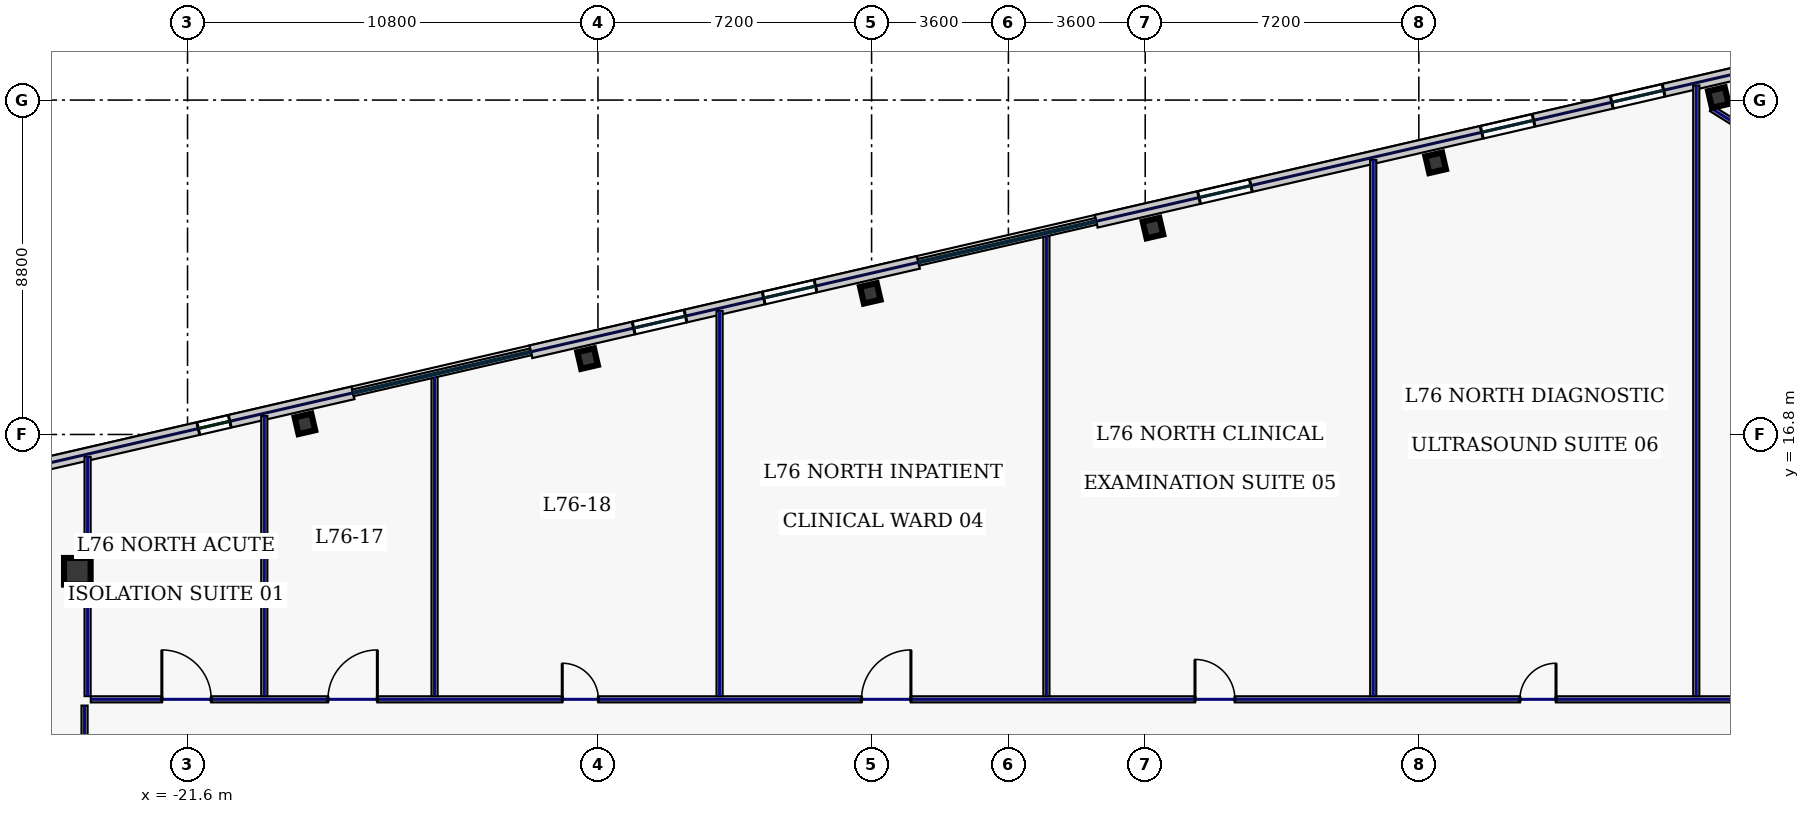
"""IFC4 building model, lengths in metres.
Left out: names, types, materials, properties, quantities, classifications, styles, units other than length and angle.
Written with IfcOpenShell. Run it as: python <this file> out.ifc"""

import sys

from ifc_helpers import new_model, si_unit, direction, frame, frame_2d, origin, origin_2d, place, context, subcontext, project, spatial, rectangle, hollow_rectangle, extrude, element, fill, save


model = new_model("IFC4")
c1 = context("Model", 3, precision=1e-05, world=origin(), true_north=direction((0.0, 1.0)))
c2 = subcontext(c1, "Body", "Model", "MODEL_VIEW")
j1 = project(units=[si_unit("LENGTHUNIT", "METRE"), si_unit("PLANEANGLEUNIT", "RADIAN")], contexts=[c1])
p1 = place(None, origin())
s1 = spatial("IfcSite", under=j1, at=p1, CompositionType="ELEMENT")
p2 = place(p1, origin())
s2 = spatial("IfcBuilding", under=s1, at=p2, CompositionType="ELEMENT")
p3 = place(p2, frame((0.0, 0.0, 325.0)))
s3 = spatial("IfcBuildingStorey", under=s2, at=p3, CompositionType="ELEMENT", Elevation=325.0)
p4 = place(p3, frame((-24.5, 13.2, 0.0), z_axis=(0.0, 0.0, 1.0), x_axis=(1.0, 0.0, 0.0)))
e1 = element("IfcColumn", 1, at=p4, inside=s3, PredefinedType="COLUMN", context=c2, shape_type="SweptSolid", body=[
    extrude(hollow_rectangle(XDim=0.7, YDim=0.7, WallThickness=0.032, at=origin_2d()), origin(), (0.0, 0.0, 1.0), 3.74),
])
for number, where, z_axis, x_axis in (
    (2, (18.682, 25.666, 0.0), (0.0, 0.0, 1.0), (0.974, 0.225, 0.0)),
    (3, (11.243, 23.949, 0.0), (0.0, 0.0, 1.0), (0.974, 0.225, 0.0)),
    (4, (3.804, 22.232, 0.0), (0.0, 0.0, 1.0), (0.974, 0.225, 0.0)),
    (5, (-3.634, 20.514, 0.0), (0.0, 0.0, 1.0), (0.974, 0.225, 0.0)),
    (6, (-11.073, 18.797, 0.0), (0.0, 0.0, 1.0), (0.974, 0.225, 0.0)),
    (7, (-18.511, 17.08, 0.0), (0.0, 0.0, 1.0), (0.974, 0.225, 0.0)),
):
    element("IfcColumn", number, at=place(p3, frame(where, z_axis=z_axis, x_axis=x_axis)), inside=s3, PredefinedType="COLUMN", context=c2, shape_type="SweptSolid", body=[
        extrude(hollow_rectangle(XDim=0.45, YDim=0.45, WallThickness=0.022, at=origin_2d()), origin(), (0.0, 0.0, 1.0), 3.74),
    ])
p5 = place(p3, frame((19.229, 26.316, 0.0), z_axis=(0.0, 0.0, 1.0), x_axis=(-0.974372473594, -0.224940620392, 0.0)))
e8 = element("IfcWall", 8, at=p5, inside=s3, PredefinedType="STANDARD", context=c2, shape_type="SweptSolid", body=[
    extrude(rectangle(XDim=17.366, YDim=0.34, at=frame_2d((8.683, 0.0))), origin(), (0.0, 0.0, 1.0), 3.74),
])
p6 = place(p5, frame((13.187, 0.0, 1.0)))
e9 = element("IfcOpeningElement", 9, at=p6, cuts=e8, PredefinedType="OPENING", context=c2, shape_type="SweptSolid", body=[
    extrude(rectangle(XDim=1.4, YDim=1.85, at=frame_2d((0.7, 0.925))), frame((0.0, 0.18, 0.0), z_axis=(0.0, -1.0, 0.0), x_axis=(1.0, 0.0, 0.0)), (0.0, 0.0, 1.0), 0.36),
])
p7 = place(p5, frame((5.553, 0.0, 1.0)))
e10 = element("IfcOpeningElement", 10, at=p7, cuts=e8, PredefinedType="OPENING", context=c2, shape_type="SweptSolid", body=[
    extrude(rectangle(XDim=1.4, YDim=1.85, at=frame_2d((0.7, 0.925))), frame((0.0, 0.18, 0.0), z_axis=(0.0, -1.0, 0.0), x_axis=(1.0, 0.0, 0.0)), (0.0, 0.0, 1.0), 0.36),
])
p8 = place(p5, frame((2.041, 0.0, 1.0)))
e11 = element("IfcOpeningElement", 11, at=p8, cuts=e8, PredefinedType="OPENING", context=c2, shape_type="SweptSolid", body=[
    extrude(rectangle(XDim=1.4, YDim=1.85, at=frame_2d((0.7, 0.925))), frame((0.0, 0.18, 0.0), z_axis=(0.0, -1.0, 0.0), x_axis=(1.0, 0.0, 0.0)), (0.0, 0.0, 1.0), 0.36),
])
p9 = place(p3, frame((-2.368, 21.33, 0.0), z_axis=(0.0, 0.0, 1.0), x_axis=(-0.974367213107, -0.224963405961, 0.0)))
e12 = element("IfcWall", 12, at=p9, inside=s3, PredefinedType="STANDARD", context=c2, shape_type="SweptSolid", body=[
    extrude(rectangle(XDim=10.468, YDim=0.34, at=frame_2d((5.234, 0.0))), origin(), (0.0, 0.0, 1.0), 3.74),
])
p10 = place(p9, frame((6.29, 0.0, 1.0)))
e13 = element("IfcOpeningElement", 13, at=p10, cuts=e12, PredefinedType="OPENING", context=c2, shape_type="SweptSolid", body=[
    extrude(rectangle(XDim=1.4, YDim=1.85, at=frame_2d((0.7, 0.925))), frame((0.0, 0.18, 0.0), z_axis=(0.0, -1.0, 0.0), x_axis=(1.0, 0.0, 0.0)), (0.0, 0.0, 1.0), 0.36),
])
p11 = place(p9, frame((2.778, 0.0, 1.0)))
e14 = element("IfcOpeningElement", 14, at=p11, cuts=e12, PredefinedType="OPENING", context=c2, shape_type="SweptSolid", body=[
    extrude(rectangle(XDim=1.4, YDim=1.85, at=frame_2d((0.7, 0.925))), frame((0.0, 0.18, 0.0), z_axis=(0.0, -1.0, 0.0), x_axis=(1.0, 0.0, 0.0)), (0.0, 0.0, 1.0), 0.36),
])
p12 = place(p3, frame((-17.245, 17.895, 0.0), z_axis=(0.0, 0.0, 1.0), x_axis=(-0.97437318493, -0.224937539085, 0.0)))
e15 = element("IfcWall", 15, at=p12, inside=s3, PredefinedType="STANDARD", context=c2, shape_type="SweptSolid", body=[
    extrude(rectangle(XDim=17.366, YDim=0.34, at=frame_2d((8.683, 0.0))), origin(), (0.0, 0.0, 1.0), 3.74),
])
p13 = place(p12, frame((13.925, 0.0, 1.0)))
e16 = element("IfcOpeningElement", 16, at=p13, cuts=e15, PredefinedType="OPENING", context=c2, shape_type="SweptSolid", body=[
    extrude(rectangle(XDim=1.4, YDim=1.85, at=frame_2d((0.7, 0.925))), frame((0.0, 0.18, 0.0), z_axis=(0.0, -1.0, 0.0), x_axis=(1.0, 0.0, 0.0)), (0.0, 0.0, 1.0), 0.36),
])
p14 = place(p12, frame((10.413, 0.0, 1.0)))
e17 = element("IfcOpeningElement", 17, at=p14, cuts=e15, PredefinedType="OPENING", context=c2, shape_type="SweptSolid", body=[
    extrude(rectangle(XDim=1.4, YDim=1.85, at=frame_2d((0.7, 0.925))), frame((0.0, 0.18, 0.0), z_axis=(0.0, -1.0, 0.0), x_axis=(1.0, 0.0, 0.0)), (0.0, 0.0, 1.0), 0.36),
])
p15 = place(p12, frame((3.329, 0.0, 1.0)))
e18 = element("IfcOpeningElement", 18, at=p15, cuts=e15, PredefinedType="OPENING", context=c2, shape_type="SweptSolid", body=[
    extrude(rectangle(XDim=0.85, YDim=1.85, at=frame_2d((0.425, 0.925))), frame((0.0, 0.18, 0.0), z_axis=(0.0, -1.0, 0.0), x_axis=(1.0, 0.0, 0.0)), (0.0, 0.0, 1.0), 0.36),
])
p16 = place(p3, frame((24.018, 21.931, 0.0), z_axis=(0.0, 0.0, 1.0), x_axis=(-0.848051009591, 0.529914601736, 0.0)))
e19 = element("IfcWall", 19, at=p16, inside=s3, PredefinedType="PARTITIONING", context=c2, shape_type="SweptSolid", body=[
    extrude(rectangle(XDim=6.505, YDim=0.16, at=frame_2d((3.253, 0.0))), origin(), (0.0, 0.0, 1.0), 3.74),
])
p17 = place(p3, frame((-24.31, -9.615, 0.0), z_axis=(0.0, 0.0, 1.0), x_axis=(0.0, 1.0, 0.0)))
e20 = element("IfcWall", 20, at=p17, inside=s3, PredefinedType="PARTITIONING", context=c2, shape_type="SweptSolid", body=[
    extrude(rectangle(XDim=19.28, YDim=0.16, at=frame_2d((9.64, 0.0))), origin(), (0.0, 0.0, 1.0), 3.74),
])
p18 = place(p17, frame((1.969, 0.0, 0.0)))
e21 = element("IfcOpeningElement", 21, at=p18, cuts=e20, PredefinedType="OPENING", context=c2, shape_type="SweptSolid", body=[
    extrude(rectangle(XDim=0.95, YDim=2.2, at=frame_2d((0.475, 1.1))), frame((0.0, 0.09, 0.0), z_axis=(0.0, -1.0, 0.0), x_axis=(1.0, 0.0, 0.0)), (0.0, 0.0, 1.0), 0.18),
])
p19 = place(p17, frame((6.625, 0.0, 0.0)))
e22 = element("IfcOpeningElement", 22, at=p19, cuts=e20, PredefinedType="OPENING", context=c2, shape_type="SweptSolid", body=[
    extrude(rectangle(XDim=0.95, YDim=2.2, at=frame_2d((0.475, 1.1))), frame((0.0, 0.09, 0.0), z_axis=(0.0, -1.0, 0.0), x_axis=(1.0, 0.0, 0.0)), (0.0, 0.0, 1.0), 0.18),
])
p20 = place(p17, frame((11.825, 0.0, 0.0)))
e23 = element("IfcOpeningElement", 23, at=p20, cuts=e20, PredefinedType="OPENING", context=c2, shape_type="SweptSolid", body=[
    extrude(rectangle(XDim=0.95, YDim=2.2, at=frame_2d((0.475, 1.1))), frame((0.0, 0.09, 0.0), z_axis=(0.0, -1.0, 0.0), x_axis=(1.0, 0.0, 0.0)), (0.0, 0.0, 1.0), 0.18),
])
p21 = place(p17, frame((16.506, 0.0, 0.0)))
e24 = element("IfcOpeningElement", 24, at=p21, cuts=e20, PredefinedType="OPENING", context=c2, shape_type="SweptSolid", body=[
    extrude(rectangle(XDim=0.95, YDim=2.2, at=frame_2d((0.475, 1.1))), frame((0.0, 0.09, 0.0), z_axis=(0.0, -1.0, 0.0), x_axis=(1.0, 0.0, 0.0)), (0.0, 0.0, 1.0), 0.18),
])
p22 = place(p3, frame((-24.145, 9.83, 0.0), z_axis=(0.0, 0.0, 1.0), x_axis=(1.0, 0.0, 0.0)))
e25 = element("IfcWall", 25, at=p22, inside=s3, PredefinedType="PARTITIONING", context=c2, shape_type="SweptSolid", body=[
    extrude(rectangle(XDim=48.29, YDim=0.16, at=frame_2d((24.145, 0.0))), origin(), (0.0, 0.0, 1.0), 3.74),
])
p23 = place(p22, frame((1.869, 0.0, 0.0)))
e26 = element("IfcOpeningElement", 26, at=p23, cuts=e25, PredefinedType="OPENING", context=c2, shape_type="SweptSolid", body=[
    extrude(rectangle(XDim=1.3, YDim=2.2, at=frame_2d((0.65, 1.1))), frame((0.0, 0.09, 0.0), z_axis=(0.0, -1.0, 0.0), x_axis=(1.0, 0.0, 0.0)), (0.0, 0.0, 1.0), 0.18),
])
p24 = place(p22, frame((6.24, 0.0, 0.0)))
e27 = element("IfcOpeningElement", 27, at=p24, cuts=e25, PredefinedType="OPENING", context=c2, shape_type="SweptSolid", body=[
    extrude(rectangle(XDim=1.3, YDim=2.2, at=frame_2d((0.65, 1.1))), frame((0.0, 0.09, 0.0), z_axis=(0.0, -1.0, 0.0), x_axis=(1.0, 0.0, 0.0)), (0.0, 0.0, 1.0), 0.18),
])
p25 = place(p22, frame((12.405, 0.0, 0.0)))
e28 = element("IfcOpeningElement", 28, at=p25, cuts=e25, PredefinedType="OPENING", context=c2, shape_type="SweptSolid", body=[
    extrude(rectangle(XDim=0.95, YDim=2.2, at=frame_2d((0.475, 1.1))), frame((0.0, 0.09, 0.0), z_axis=(0.0, -1.0, 0.0), x_axis=(1.0, 0.0, 0.0)), (0.0, 0.0, 1.0), 0.18),
])
p26 = place(p22, frame((20.28, 0.0, 0.0)))
e29 = element("IfcOpeningElement", 29, at=p26, cuts=e25, PredefinedType="OPENING", context=c2, shape_type="SweptSolid", body=[
    extrude(rectangle(XDim=1.3, YDim=2.2, at=frame_2d((0.65, 1.1))), frame((0.0, 0.09, 0.0), z_axis=(0.0, -1.0, 0.0), x_axis=(1.0, 0.0, 0.0)), (0.0, 0.0, 1.0), 0.18),
])
p27 = place(p22, frame((29.055, 0.0, 0.0)))
e30 = element("IfcOpeningElement", 30, at=p27, cuts=e25, PredefinedType="OPENING", context=c2, shape_type="SweptSolid", body=[
    extrude(rectangle(XDim=1.05, YDim=2.2, at=frame_2d((0.525, 1.1))), frame((0.0, 0.09, 0.0), z_axis=(0.0, -1.0, 0.0), x_axis=(1.0, 0.0, 0.0)), (0.0, 0.0, 1.0), 0.18),
])
p28 = place(p22, frame((37.605, 0.0, 0.0)))
e31 = element("IfcOpeningElement", 31, at=p28, cuts=e25, PredefinedType="OPENING", context=c2, shape_type="SweptSolid", body=[
    extrude(rectangle(XDim=0.95, YDim=2.2, at=frame_2d((0.475, 1.1))), frame((0.0, 0.09, 0.0), z_axis=(0.0, -1.0, 0.0), x_axis=(1.0, 0.0, 0.0)), (0.0, 0.0, 1.0), 0.18),
])
p29 = place(p22, frame((44.726, 0.0, 0.0)))
e32 = element("IfcOpeningElement", 32, at=p29, cuts=e25, PredefinedType="OPENING", context=c2, shape_type="SweptSolid", body=[
    extrude(rectangle(XDim=0.95, YDim=2.2, at=frame_2d((0.475, 1.1))), frame((0.0, 0.09, 0.0), z_axis=(0.0, -1.0, 0.0), x_axis=(1.0, 0.0, 0.0)), (0.0, 0.0, 1.0), 0.18),
])
p30 = place(p3, frame((-24.23, 9.915, 0.0), z_axis=(0.0, 0.0, 1.0), x_axis=(0.0, 1.0, 0.0)))
e33 = element("IfcWall", 33, at=p30, inside=s3, PredefinedType="PARTITIONING", context=c2, shape_type="SweptSolid", body=[
    extrude(rectangle(XDim=6.296, YDim=0.16, at=frame_2d((3.148, 0.0))), origin(), (0.0, 0.0, 1.0), 3.74),
])
p31 = place(p3, frame((-19.58, 9.915, 0.0), z_axis=(0.0, 0.0, 1.0), x_axis=(0.0, 1.0, 0.0)))
e34 = element("IfcWall", 34, at=p31, inside=s3, PredefinedType="PARTITIONING", context=c2, shape_type="SweptSolid", body=[
    extrude(rectangle(XDim=7.369, YDim=0.16, at=frame_2d((3.685, 0.0))), origin(), (0.0, 0.0, 1.0), 3.74),
])
p32 = place(p3, frame((-15.1, 9.915, 0.0), z_axis=(0.0, 0.0, 1.0), x_axis=(0.0, 1.0, 0.0)))
e35 = element("IfcWall", 35, at=p32, inside=s3, PredefinedType="PARTITIONING", context=c2, shape_type="SweptSolid", body=[
    extrude(rectangle(XDim=8.404, YDim=0.16, at=frame_2d((4.202, 0.0))), origin(), (0.0, 0.0, 1.0), 3.74),
])
p33 = place(p3, frame((-7.6, 9.915, 0.0), z_axis=(0.0, 0.0, 1.0), x_axis=(0.0, 1.0, 0.0)))
e36 = element("IfcWall", 36, at=p33, inside=s3, PredefinedType="PARTITIONING", context=c2, shape_type="SweptSolid", body=[
    extrude(rectangle(XDim=10.135, YDim=0.16, at=frame_2d((5.068, 0.0))), origin(), (0.0, 0.0, 1.0), 3.74),
])
p34 = place(p3, frame((1.0, 9.915, 0.0), z_axis=(0.0, 0.0, 1.0), x_axis=(0.0, 1.0, 0.0)))
e37 = element("IfcWall", 37, at=p34, inside=s3, PredefinedType="PARTITIONING", context=c2, shape_type="SweptSolid", body=[
    extrude(rectangle(XDim=12.121, YDim=0.16, at=frame_2d((6.06, 0.0))), origin(), (0.0, 0.0, 1.0), 3.74),
])
p35 = place(p3, frame((9.6, 9.915, 0.0), z_axis=(0.0, 0.0, 1.0), x_axis=(0.0, 1.0, 0.0)))
e38 = element("IfcWall", 38, at=p35, inside=s3, PredefinedType="PARTITIONING", context=c2, shape_type="SweptSolid", body=[
    extrude(rectangle(XDim=14.106, YDim=0.16, at=frame_2d((7.053, 0.0))), origin(), (0.0, 0.0, 1.0), 3.74),
])
p36 = place(p3, frame((18.1, 9.915, 0.0), z_axis=(0.0, 0.0, 1.0), x_axis=(0.0, 1.0, 0.0)))
e39 = element("IfcWall", 39, at=p36, inside=s3, PredefinedType="PARTITIONING", context=c2, shape_type="SweptSolid", body=[
    extrude(rectangle(XDim=16.069, YDim=0.16, at=frame_2d((8.034, 0.0))), origin(), (0.0, 0.0, 1.0), 3.74),
])
p37 = place(p6, origin())
e40 = element("IfcWindow", 40, at=p37, inside=s3, PartitioningType="SINGLE_PANEL", PredefinedType="WINDOW", context=c2, shape_type="SweptSolid", body=[
    extrude(rectangle(XDim=1.4, YDim=1.85, at=frame_2d((0.7, 0.925))), frame((0.0, 0.03, 0.0), z_axis=(0.0, -1.0, 0.0), x_axis=(1.0, 0.0, 0.0)), (0.0, 0.0, 1.0), 0.06),
])
fill(e9, e40)
p38 = place(p7, origin())
e41 = element("IfcWindow", 41, at=p38, inside=s3, PartitioningType="SINGLE_PANEL", PredefinedType="WINDOW", context=c2, shape_type="SweptSolid", body=[
    extrude(rectangle(XDim=1.4, YDim=1.85, at=frame_2d((0.7, 0.925))), frame((0.0, 0.03, 0.0), z_axis=(0.0, -1.0, 0.0), x_axis=(1.0, 0.0, 0.0)), (0.0, 0.0, 1.0), 0.06),
])
fill(e10, e41)
p39 = place(p8, origin())
e42 = element("IfcWindow", 42, at=p39, inside=s3, PartitioningType="SINGLE_PANEL", PredefinedType="WINDOW", context=c2, shape_type="SweptSolid", body=[
    extrude(rectangle(XDim=1.4, YDim=1.85, at=frame_2d((0.7, 0.925))), frame((0.0, 0.03, 0.0), z_axis=(0.0, -1.0, 0.0), x_axis=(1.0, 0.0, 0.0)), (0.0, 0.0, 1.0), 0.06),
])
fill(e11, e42)
p40 = place(p10, origin())
e43 = element("IfcWindow", 43, at=p40, inside=s3, PartitioningType="SINGLE_PANEL", PredefinedType="WINDOW", context=c2, shape_type="SweptSolid", body=[
    extrude(rectangle(XDim=1.4, YDim=1.85, at=frame_2d((0.7, 0.925))), frame((0.0, 0.03, 0.0), z_axis=(0.0, -1.0, 0.0), x_axis=(1.0, 0.0, 0.0)), (0.0, 0.0, 1.0), 0.06),
])
fill(e13, e43)
p41 = place(p11, origin())
e44 = element("IfcWindow", 44, at=p41, inside=s3, PartitioningType="SINGLE_PANEL", PredefinedType="WINDOW", context=c2, shape_type="SweptSolid", body=[
    extrude(rectangle(XDim=1.4, YDim=1.85, at=frame_2d((0.7, 0.925))), frame((0.0, 0.03, 0.0), z_axis=(0.0, -1.0, 0.0), x_axis=(1.0, 0.0, 0.0)), (0.0, 0.0, 1.0), 0.06),
])
fill(e14, e44)
p42 = place(p15, origin())
e45 = element("IfcWindow", 45, at=p42, inside=s3, PartitioningType="SINGLE_PANEL", PredefinedType="WINDOW", context=c2, shape_type="SweptSolid", body=[
    extrude(rectangle(XDim=0.85, YDim=1.85, at=frame_2d((0.425, 0.925))), frame((0.0, 0.03, 0.0), z_axis=(0.0, -1.0, 0.0), x_axis=(1.0, 0.0, 0.0)), (0.0, 0.0, 1.0), 0.06),
])
fill(e18, e45)
p43 = place(p23, origin())
e46 = element("IfcDoor", 46, at=p43, inside=s3, OperationType="SINGLE_SWING_LEFT", PredefinedType="DOOR", context=c2, shape_type="SweptSolid", body=[
    extrude(rectangle(XDim=1.3, YDim=2.2, at=frame_2d((0.65, 1.1))), frame((0.0, 0.025, 0.0), z_axis=(0.0, -1.0, 0.0), x_axis=(1.0, 0.0, 0.0)), (0.0, 0.0, 1.0), 0.05),
])
fill(e26, e46)
p44 = place(p24, origin())
e47 = element("IfcDoor", 47, at=p44, inside=s3, OperationType="SINGLE_SWING_RIGHT", PredefinedType="DOOR", context=c2, shape_type="SweptSolid", body=[
    extrude(rectangle(XDim=1.3, YDim=2.2, at=frame_2d((0.65, 1.1))), frame((0.0, 0.025, 0.0), z_axis=(0.0, -1.0, 0.0), x_axis=(1.0, 0.0, 0.0)), (0.0, 0.0, 1.0), 0.05),
])
fill(e27, e47)
p45 = place(p25, origin())
e48 = element("IfcDoor", 48, at=p45, inside=s3, OperationType="SINGLE_SWING_LEFT", PredefinedType="DOOR", context=c2, shape_type="SweptSolid", body=[
    extrude(rectangle(XDim=0.95, YDim=2.2, at=frame_2d((0.475, 1.1))), frame((0.0, 0.025, 0.0), z_axis=(0.0, -1.0, 0.0), x_axis=(1.0, 0.0, 0.0)), (0.0, 0.0, 1.0), 0.05),
])
fill(e28, e48)
p46 = place(p26, origin())
e49 = element("IfcDoor", 49, at=p46, inside=s3, OperationType="SINGLE_SWING_RIGHT", PredefinedType="DOOR", context=c2, shape_type="SweptSolid", body=[
    extrude(rectangle(XDim=1.3, YDim=2.2, at=frame_2d((0.65, 1.1))), frame((0.0, 0.025, 0.0), z_axis=(0.0, -1.0, 0.0), x_axis=(1.0, 0.0, 0.0)), (0.0, 0.0, 1.0), 0.05),
])
fill(e29, e49)
p47 = place(p27, origin())
e50 = element("IfcDoor", 50, at=p47, inside=s3, OperationType="SINGLE_SWING_LEFT", PredefinedType="DOOR", context=c2, shape_type="SweptSolid", body=[
    extrude(rectangle(XDim=1.05, YDim=2.2, at=frame_2d((0.525, 1.1))), frame((0.0, 0.025, 0.0), z_axis=(0.0, -1.0, 0.0), x_axis=(1.0, 0.0, 0.0)), (0.0, 0.0, 1.0), 0.05),
])
fill(e30, e50)
p48 = place(p28, origin())
e51 = element("IfcDoor", 51, at=p48, inside=s3, OperationType="SINGLE_SWING_RIGHT", PredefinedType="DOOR", context=c2, shape_type="SweptSolid", body=[
    extrude(rectangle(XDim=0.95, YDim=2.2, at=frame_2d((0.475, 1.1))), frame((0.0, 0.025, 0.0), z_axis=(0.0, -1.0, 0.0), x_axis=(1.0, 0.0, 0.0)), (0.0, 0.0, 1.0), 0.05),
])
fill(e31, e51)
save(model, sys.argv[1])
